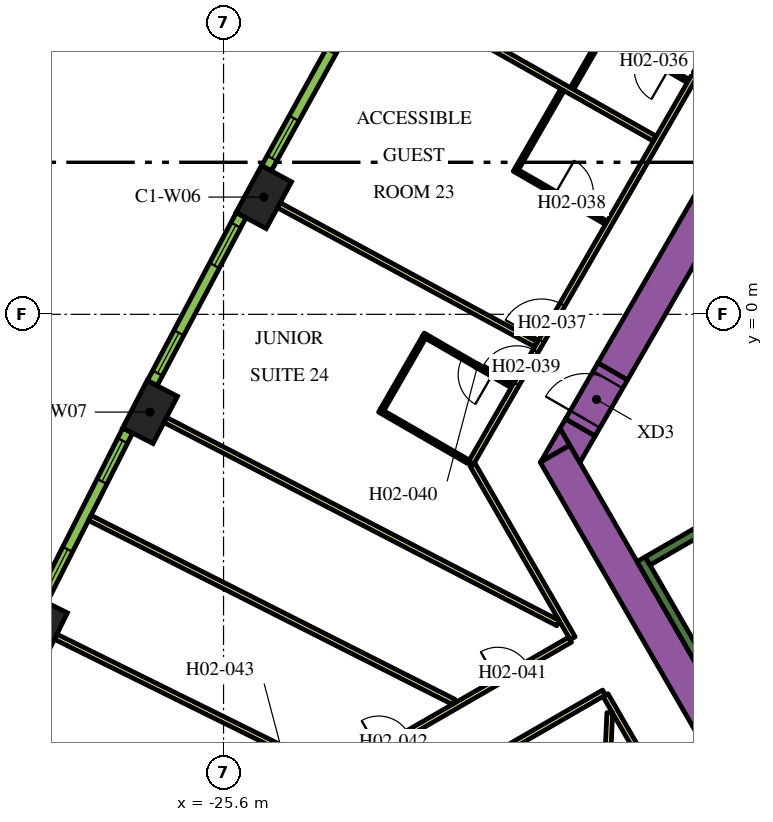
"""IFC4 building model, lengths in metres.
Left out: names, types, materials, properties, quantities, classifications, styles, units other than length and angle.
Written with IfcOpenShell. Run it as: python <this file> out.ifc"""

import sys

from ifc_helpers import new_model, si_unit, direction, frame, frame_2d, origin, origin_2d, place, context, subcontext, project, spatial, polyline, rectangle, outline, extrude, element, fill, save


model = new_model("IFC4")
c1 = context("Model", 3, precision=1e-05, world=origin(), true_north=direction((0.0, 1.0)))
c2 = subcontext(c1, "Body", "Model", "MODEL_VIEW")
j1 = project(units=[si_unit("LENGTHUNIT", "METRE"), si_unit("PLANEANGLEUNIT", "RADIAN")], contexts=[c1])
p1 = place(None, origin())
s1 = spatial("IfcSite", under=j1, at=p1, CompositionType="ELEMENT")
p2 = place(p1, origin())
s2 = spatial("IfcBuilding", under=s1, at=p2, CompositionType="ELEMENT")
p3 = place(p2, frame((0.0, 0.0, 47.1)))
s3 = spatial("IfcBuildingStorey", under=s2, at=p3, CompositionType="ELEMENT", Elevation=47.1)
for number, where, z_axis, x_axis in (
    (1, (-24.54, 3.085, 0.0), (0.0, 0.0, 1.0), (-0.476, -0.88, 0.0)),
    (2, (-27.533, -2.572, 0.0), (0.0, 0.0, 1.0), (-0.459, -0.888, 0.0)),
    (3, (-30.421, -8.284, 0.0), (0.0, 0.0, 1.0), (-0.443, -0.897, 0.0)),
):
    element("IfcColumn", number, at=place(p3, frame(where, z_axis=z_axis, x_axis=x_axis)), inside=s3, PredefinedType="COLUMN", context=c2, shape_type="SweptSolid", body=[
        extrude(rectangle(XDim=1.4, YDim=0.9, at=origin_2d()), origin(), (0.0, 0.0, 1.0), 3.9),
    ])
p4 = place(p3, frame((-15.36, -1.503, 0.0), z_axis=(0.0, 0.0, 1.0), x_axis=(0.50000389221, 0.866023156604, 0.0)))
e4 = element("IfcWall", 4, at=p4, inside=s3, PredefinedType="SOLIDWALL", context=c2, shape_type="SweptSolid", body=[
    extrude(rectangle(XDim=21.0, YDim=0.9, at=frame_2d((10.5, 0.0))), origin(), (0.0, 0.0, 1.0), 3.9),
])
p5 = place(p3, frame((-12.134, -11.883, 0.0), z_axis=(0.0, 0.0, 1.0), x_axis=(-0.500005339912, 0.866022320763, 0.0)))
e5 = element("IfcWall", 5, at=p5, inside=s3, PredefinedType="SOLIDWALL", context=c2, shape_type="SweptSolid", body=[
    extrude(rectangle(XDim=9.488, YDim=0.9, at=frame_2d((4.744, 0.0))), origin(), (0.0, 0.0, 1.0), 3.9),
])
p6 = place(p3, origin())
e6 = element("IfcWall", 6, at=p6, inside=s3, PredefinedType="SOLIDWALL", context=c2, shape_type="SweptSolid", body=[
    extrude(outline(polyline([(-16.489, -3.44), (-17.251, -3.88), (-16.743, -3.0), (-16.489, -3.44)])), origin(), (0.0, 0.0, 1.0), 3.9),
])
e7 = element("IfcWall", 7, at=p6, inside=s3, PredefinedType="SOLIDWALL", context=c2, shape_type="SweptSolid", body=[
    extrude(outline(polyline([(-15.82, -3.201), (-16.223, -3.9), (-16.743, -3.0), (-16.599, -2.751), (-15.82, -3.201)])), origin(), (0.0, 0.0, 1.0), 3.9),
])
p7 = place(p3, frame((-12.885, -9.431, 0.0), z_axis=(0.0, 0.0, 1.0), x_axis=(-0.500020560727, 0.866013532718, 0.0)))
e8 = element("IfcWall", 8, at=p7, inside=s3, PredefinedType="SOLIDWALL", context=c2, shape_type="SweptSolid", body=[
    extrude(rectangle(XDim=3.45, YDim=0.25, at=frame_2d((1.725, 0.0))), origin(), (0.0, 0.0, 1.0), 3.9),
])
p8 = place(p3, frame((-14.44, -6.49, 0.0), z_axis=(0.0, 0.0, 1.0), x_axis=(0.866022966069, 0.500004222222, 0.0)))
e9 = element("IfcWall", 9, at=p8, inside=s3, PredefinedType="SOLIDWALL", context=c2, shape_type="SweptSolid", body=[
    extrude(rectangle(XDim=6.8, YDim=0.25, at=frame_2d((3.4, 0.0))), origin(), (0.0, 0.0, 1.0), 3.9),
])
p9 = place(p3, frame((-16.209, -2.976, 0.0), z_axis=(0.0, 0.0, 1.0), x_axis=(0.499954529098, 0.86605165483, 0.0)))
e10 = element("IfcWall", 10, at=p9, inside=s3, PredefinedType="SOLIDWALL", context=c2, shape_type="SweptSolid", body=[
    extrude(rectangle(XDim=1.7, YDim=0.9, at=frame_2d((0.85, 0.0))), origin(), (0.0, 0.0, 1.0), 3.9),
])
p10 = place(p9, frame((0.25, 0.0, 0.0)))
e11 = element("IfcOpeningElement", 11, at=p10, cuts=e10, PredefinedType="OPENING", context=c2, shape_type="SweptSolid", body=[
    extrude(rectangle(XDim=1.2, YDim=2.1, at=frame_2d((0.6, 1.05))), frame((0.0, 0.46, 0.0), z_axis=(0.0, -1.0, 0.0), x_axis=(1.0, 0.0, 0.0)), (0.0, 0.0, 1.0), 0.92),
])
p11 = place(p3, frame((-19.081, -3.9, 0.0), z_axis=(0.0, 0.0, 1.0), x_axis=(0.499998313975, 0.866026377209, 0.0)))
e12 = element("IfcWall", 12, at=p11, inside=s3, PredefinedType="PARTITIONING", context=c2, shape_type="SweptSolid", body=[
    extrude(rectangle(XDim=25.766, YDim=0.15, at=frame_2d((12.883, 0.0))), origin(), (0.0, 0.0, 1.0), 2.75),
])
p12 = place(p11, frame((16.196, 0.0, 0.0)))
e13 = element("IfcOpeningElement", 13, at=p12, cuts=e12, PredefinedType="OPENING", context=c2, shape_type="SweptSolid", body=[
    extrude(rectangle(XDim=1.0, YDim=2.1, at=frame_2d((0.5, 1.05))), frame((0.0, 0.085, 0.0), z_axis=(0.0, -1.0, 0.0), x_axis=(1.0, 0.0, 0.0)), (0.0, 0.0, 1.0), 0.17),
])
p13 = place(p11, frame((14.889, 0.0, 0.0)))
e14 = element("IfcOpeningElement", 14, at=p13, cuts=e12, PredefinedType="OPENING", context=c2, shape_type="SweptSolid", body=[
    extrude(rectangle(XDim=1.0, YDim=2.1, at=frame_2d((0.5, 1.05))), frame((0.0, 0.085, 0.0), z_axis=(0.0, -1.0, 0.0), x_axis=(1.0, 0.0, 0.0)), (0.0, 0.0, 1.0), 0.17),
])
p14 = place(p11, frame((3.698, 0.0, 0.0)))
e15 = element("IfcOpeningElement", 15, at=p14, cuts=e12, PredefinedType="OPENING", context=c2, shape_type="SweptSolid", body=[
    extrude(rectangle(XDim=1.1, YDim=2.1, at=frame_2d((0.55, 1.05))), frame((0.0, 0.085, 0.0), z_axis=(0.0, -1.0, 0.0), x_axis=(1.0, 0.0, 0.0)), (0.0, 0.0, 1.0), 0.17),
])
p15 = place(p11, frame((2.392, 0.0, 0.0)))
e16 = element("IfcOpeningElement", 16, at=p15, cuts=e12, PredefinedType="OPENING", context=c2, shape_type="SweptSolid", body=[
    extrude(rectangle(XDim=1.0, YDim=2.1, at=frame_2d((0.5, 1.05))), frame((0.0, 0.085, 0.0), z_axis=(0.0, -1.0, 0.0), x_axis=(1.0, 0.0, 0.0)), (0.0, 0.0, 1.0), 0.17),
])
p16 = place(p3, frame((-16.412, -8.523, 0.0), z_axis=(0.0, 0.0, 1.0), x_axis=(-0.500001929737, 0.866024289647, 0.0)))
e17 = element("IfcWall", 17, at=p16, inside=s3, PredefinedType="PARTITIONING", context=c2, shape_type="SweptSolid", body=[
    extrude(rectangle(XDim=5.268, YDim=0.15, at=frame_2d((2.634, 0.0))), origin(), (0.0, 0.0, 1.0), 2.75),
])
p17 = place(p3, frame((-30.463, -16.635, 0.0), z_axis=(0.0, 0.0, 1.0), x_axis=(0.866022394896, 0.500005211512, 0.0)))
e18 = element("IfcWall", 18, at=p17, inside=s3, PredefinedType="PARTITIONING", context=c2, shape_type="SweptSolid", body=[
    extrude(rectangle(XDim=16.144, YDim=0.15, at=frame_2d((8.072, 0.0))), origin(), (0.0, 0.0, 1.0), 2.75),
])
p18 = place(p17, frame((13.948, 0.0, 0.0)))
e19 = element("IfcOpeningElement", 19, at=p18, cuts=e18, PredefinedType="OPENING", context=c2, shape_type="SweptSolid", body=[
    extrude(rectangle(XDim=0.9, YDim=2.1, at=frame_2d((0.45, 1.05))), frame((0.0, 0.085, 0.0), z_axis=(0.0, -1.0, 0.0), x_axis=(1.0, 0.0, 0.0)), (0.0, 0.0, 1.0), 0.17),
])
p19 = place(p17, frame((10.329, 0.0, 0.0)))
e20 = element("IfcOpeningElement", 20, at=p19, cuts=e18, PredefinedType="OPENING", context=c2, shape_type="SweptSolid", body=[
    extrude(rectangle(XDim=0.9, YDim=2.1, at=frame_2d((0.45, 1.05))), frame((0.0, 0.085, 0.0), z_axis=(0.0, -1.0, 0.0), x_axis=(1.0, 0.0, 0.0)), (0.0, 0.0, 1.0), 0.17),
])
p20 = place(p17, frame((7.274, 0.0, 0.0)))
e21 = element("IfcOpeningElement", 21, at=p20, cuts=e18, PredefinedType="OPENING", context=c2, shape_type="SweptSolid", body=[
    extrude(rectangle(XDim=1.0, YDim=2.1, at=frame_2d((0.5, 1.05))), frame((0.0, 0.085, 0.0), z_axis=(0.0, -1.0, 0.0), x_axis=(1.0, 0.0, 0.0)), (0.0, 0.0, 1.0), 0.17),
])
p21 = place(p3, frame((-15.587, -9.952, 0.0), z_axis=(0.0, 0.0, 1.0), x_axis=(-0.866022197818, -0.500005552856, 0.0)))
e22 = element("IfcWall", 22, at=p21, inside=s3, PredefinedType="PARTITIONING", context=c2, shape_type="SweptSolid", body=[
    extrude(rectangle(XDim=16.224, YDim=0.15, at=frame_2d((8.112, 0.0))), origin(), (0.0, 0.0, 1.0), 2.75),
])
p22 = place(p21, frame((7.949, 0.0, 0.0)))
e23 = element("IfcOpeningElement", 23, at=p22, cuts=e22, PredefinedType="OPENING", context=c2, shape_type="SweptSolid", body=[
    extrude(rectangle(XDim=1.0, YDim=2.1, at=frame_2d((0.5, 1.05))), frame((0.0, 0.085, 0.0), z_axis=(0.0, -1.0, 0.0), x_axis=(1.0, 0.0, 0.0)), (0.0, 0.0, 1.0), 0.17),
])
p23 = place(p21, frame((3.172, 0.0, 0.0)))
e24 = element("IfcOpeningElement", 24, at=p23, cuts=e22, PredefinedType="OPENING", context=c2, shape_type="SweptSolid", body=[
    extrude(rectangle(XDim=1.0, YDim=2.1, at=frame_2d((0.5, 1.05))), frame((0.0, 0.085, 0.0), z_axis=(0.0, -1.0, 0.0), x_axis=(1.0, 0.0, 0.0)), (0.0, 0.0, 1.0), 0.17),
])
p24 = place(p3, frame((-12.918, -14.575, 0.0), z_axis=(0.0, 0.0, 1.0), x_axis=(-0.500009150678, 0.866020120573, 0.0)))
e25 = element("IfcWall", 25, at=p24, inside=s3, PredefinedType="PARTITIONING", context=c2, shape_type="SweptSolid", body=[
    extrude(rectangle(XDim=5.258, YDim=0.15, at=frame_2d((2.629, 0.0))), origin(), (0.0, 0.0, 1.0), 2.75),
])
p25 = place(p24, frame((1.888, 0.0, 0.0)))
e26 = element("IfcOpeningElement", 26, at=p25, cuts=e25, PredefinedType="OPENING", context=c2, shape_type="SweptSolid", body=[
    extrude(rectangle(XDim=1.0, YDim=2.1, at=frame_2d((0.5, 1.05))), frame((0.0, 0.085, 0.0), z_axis=(0.0, -1.0, 0.0), x_axis=(1.0, 0.0, 0.0)), (0.0, 0.0, 1.0), 0.17),
])
p26 = place(p3, frame((-30.018, -8.483, 0.0), z_axis=(0.0, 0.0, 1.0), x_axis=(0.896544505264, -0.44295366584, 0.0)))
e27 = element("IfcWall", 27, at=p26, inside=s3, PredefinedType="PARTITIONING", context=c2, shape_type="SweptSolid", body=[
    extrude(rectangle(XDim=8.079, YDim=0.15, at=frame_2d((4.04, 0.0))), origin(), (0.0, 0.0, 1.0), 2.75),
])
p27 = place(p3, frame((-29.12, -5.356, 0.0), z_axis=(0.0, 0.0, 1.0), x_axis=(0.892401965553, -0.451241323327, 0.0)))
e28 = element("IfcWall", 28, at=p27, inside=s3, PredefinedType="PARTITIONING", context=c2, shape_type="SweptSolid", body=[
    extrude(rectangle(XDim=10.729, YDim=0.15, at=frame_2d((5.364, 0.0))), origin(), (0.0, 0.0, 1.0), 2.75),
])
p28 = place(p3, frame((-24.145, 2.871, 0.0), z_axis=(0.0, 0.0, 1.0), x_axis=(0.879551725039, -0.475803281809, 0.0)))
e29 = element("IfcWall", 29, at=p28, inside=s3, PredefinedType="PARTITIONING", context=c2, shape_type="SweptSolid", body=[
    extrude(rectangle(XDim=7.688, YDim=0.15, at=frame_2d((3.844, 0.0))), origin(), (0.0, 0.0, 1.0), 2.75),
])
p29 = place(p3, frame((-27.134, -2.779, 0.0), z_axis=(0.0, 0.0, 1.0), x_axis=(0.8882049501, -0.459447457951, 0.0)))
e30 = element("IfcWall", 30, at=p29, inside=s3, PredefinedType="PARTITIONING", context=c2, shape_type="SweptSolid", body=[
    extrude(rectangle(XDim=11.638, YDim=0.15, at=frame_2d((5.819, 0.0))), origin(), (0.0, 0.0, 1.0), 2.75),
])
p30 = place(p3, frame((-15.973, -22.109, 0.0), z_axis=(0.0, 0.0, 1.0), x_axis=(0.046191717129, 0.998932592955, 0.0)))
e31 = element("IfcWall", 31, at=p30, inside=s3, PredefinedType="PARTITIONING", context=c2, shape_type="SweptSolid", body=[
    extrude(rectangle(XDim=11.638, YDim=0.15, at=frame_2d((5.819, 0.0))), origin(), (0.0, 0.0, 1.0), 2.75),
])
p31 = place(p3, frame((-21.052, 8.464, 0.0), z_axis=(0.0, 0.0, 1.0), x_axis=(0.87059371954, -0.492002617368, 0.0)))
e32 = element("IfcWall", 32, at=p31, inside=s3, PredefinedType="PARTITIONING", context=c2, shape_type="SweptSolid", body=[
    extrude(rectangle(XDim=7.803, YDim=0.15, at=frame_2d((3.902, 0.0))), origin(), (0.0, 0.0, 1.0), 2.75),
])
p32 = place(p3, frame((-13.373, 6.138, 0.0), z_axis=(0.0, 0.0, 1.0), x_axis=(-0.866062058628, 0.499936506574, 0.0)))
e33 = element("IfcWall", 33, at=p32, inside=s3, PredefinedType="PARTITIONING", context=c2, shape_type="SweptSolid", body=[
    extrude(rectangle(XDim=2.6, YDim=0.1, at=frame_2d((1.3, 0.0))), origin(), (0.0, 0.0, 1.0), 2.75),
])
p33 = place(p32, frame((0.6, 0.0, 0.0)))
e34 = element("IfcOpeningElement", 34, at=p33, cuts=e33, PredefinedType="OPENING", context=c2, shape_type="SweptSolid", body=[
    extrude(rectangle(XDim=0.9, YDim=2.1, at=frame_2d((0.45, 1.05))), frame((0.0, 0.06, 0.0), z_axis=(0.0, -1.0, 0.0), x_axis=(1.0, 0.0, 0.0)), (0.0, 0.0, 1.0), 0.12),
])
p34 = place(p3, frame((-15.606, 7.37, 0.0), z_axis=(0.0, 0.0, 1.0), x_axis=(-0.499974350878, -0.866040211805, 0.0)))
e35 = element("IfcWall", 35, at=p34, inside=s3, PredefinedType="PARTITIONING", context=c2, shape_type="SweptSolid", body=[
    extrude(rectangle(XDim=1.65, YDim=0.1, at=frame_2d((0.825, 0.0))), origin(), (0.0, 0.0, 1.0), 2.75),
])
p35 = place(p3, frame((-17.951, 3.808, 0.0), z_axis=(0.0, 0.0, 1.0), x_axis=(0.866034573852, -0.49998411664, 0.0)))
e36 = element("IfcWall", 36, at=p35, inside=s3, PredefinedType="PARTITIONING", context=c2, shape_type="SweptSolid", body=[
    extrude(rectangle(XDim=2.8, YDim=0.1, at=frame_2d((1.4, 0.0))), origin(), (0.0, 0.0, 1.0), 2.75),
])
p36 = place(p35, frame((1.25, 0.0, 0.0)))
e37 = element("IfcOpeningElement", 37, at=p36, cuts=e36, PredefinedType="OPENING", context=c2, shape_type="SweptSolid", body=[
    extrude(rectangle(XDim=1.0, YDim=2.1, at=frame_2d((0.5, 1.05))), frame((0.0, 0.06, 0.0), z_axis=(0.0, -1.0, 0.0), x_axis=(1.0, 0.0, 0.0)), (0.0, 0.0, 1.0), 0.12),
])
p37 = place(p3, frame((-17.878, 3.835, 0.0), z_axis=(0.0, 0.0, 1.0), x_axis=(0.500061428766, 0.865989934965, 0.0)))
e38 = element("IfcWall", 38, at=p37, inside=s3, PredefinedType="PARTITIONING", context=c2, shape_type="SweptSolid", body=[
    extrude(rectangle(XDim=2.39, YDim=0.1, at=frame_2d((1.195, 0.0))), origin(), (0.0, 0.0, 1.0), 2.75),
])
p38 = place(p3, frame((-18.006, -1.888, 0.0), z_axis=(0.0, 0.0, 1.0), x_axis=(-0.866036505625, 0.499980770555, 0.0)))
e39 = element("IfcWall", 39, at=p38, inside=s3, PredefinedType="PARTITIONING", context=c2, shape_type="SweptSolid", body=[
    extrude(rectangle(XDim=2.7, YDim=0.1, at=frame_2d((1.35, 0.0))), origin(), (0.0, 0.0, 1.0), 2.75),
])
p39 = place(p38, frame((0.6, 0.0, 0.0)))
e40 = element("IfcOpeningElement", 40, at=p39, cuts=e39, PredefinedType="OPENING", context=c2, shape_type="SweptSolid", body=[
    extrude(rectangle(XDim=0.9, YDim=2.1, at=frame_2d((0.45, 1.05))), frame((0.0, 0.06, 0.0), z_axis=(0.0, -1.0, 0.0), x_axis=(1.0, 0.0, 0.0)), (0.0, 0.0, 1.0), 0.12),
])
p40 = place(p3, frame((-20.326, -0.606, 0.0), z_axis=(0.0, 0.0, 1.0), x_axis=(-0.499946605688, -0.86605622881, 0.0)))
e41 = element("IfcWall", 41, at=p40, inside=s3, PredefinedType="PARTITIONING", context=c2, shape_type="SweptSolid", body=[
    extrude(rectangle(XDim=2.2, YDim=0.1, at=frame_2d((1.1, 0.0))), origin(), (0.0, 0.0, 1.0), 2.75),
])
p41 = place(p3, frame((-19.156, -3.88, 0.0), z_axis=(0.0, 0.0, 1.0), x_axis=(-0.86599734893, 0.500048589285, 0.0)))
e42 = element("IfcWall", 42, at=p41, inside=s3, PredefinedType="PARTITIONING", context=c2, shape_type="SweptSolid", body=[
    extrude(rectangle(XDim=2.7, YDim=0.1, at=frame_2d((1.35, 0.0))), origin(), (0.0, 0.0, 1.0), 2.75),
])
p42 = place(p3, frame((-22.05, 8.22, 0.0), z_axis=(0.0, 0.0, 1.0), x_axis=(-0.483912572871, -0.875116347589, 0.0)))
e43 = element("IfcWall", 43, at=p42, inside=s3, PredefinedType="SOLIDWALL", context=c2, shape_type="SweptSolid", body=[
    extrude(rectangle(XDim=4.998, YDim=0.29, at=frame_2d((2.499, 0.0))), origin(), (0.0, 0.0, 1.0), 3.65),
])
p43 = place(p42, frame((0.297, 0.0, 0.9)))
e44 = element("IfcOpeningElement", 44, at=p43, cuts=e43, PredefinedType="OPENING", context=c2, shape_type="SweptSolid", body=[
    extrude(rectangle(XDim=1.2, YDim=2.15, at=frame_2d((0.6, 1.075))), frame((0.0, 0.155, 0.0), z_axis=(0.0, -1.0, 0.0), x_axis=(1.0, 0.0, 0.0)), (0.0, 0.0, 1.0), 0.31),
])
p44 = place(p42, frame((3.501, 0.0, 0.9)))
e45 = element("IfcOpeningElement", 45, at=p44, cuts=e43, PredefinedType="OPENING", context=c2, shape_type="SweptSolid", body=[
    extrude(rectangle(XDim=1.2, YDim=2.15, at=frame_2d((0.6, 1.075))), frame((0.0, 0.155, 0.0), z_axis=(0.0, -1.0, 0.0), x_axis=(1.0, 0.0, 0.0)), (0.0, 0.0, 1.0), 0.31),
])
p45 = place(p3, frame((-25.138, 2.608, 0.0), z_axis=(0.0, 0.0, 1.0), x_axis=(-0.467629620899, -0.883924509026, 0.0)))
e46 = element("IfcWall", 46, at=p45, inside=s3, PredefinedType="SOLIDWALL", context=c2, shape_type="SweptSolid", body=[
    extrude(rectangle(XDim=4.998, YDim=0.29, at=frame_2d((2.499, 0.0))), origin(), (0.0, 0.0, 1.0), 3.65),
])
p46 = place(p45, frame((0.297, 0.0, 0.9)))
e47 = element("IfcOpeningElement", 47, at=p46, cuts=e46, PredefinedType="OPENING", context=c2, shape_type="SweptSolid", body=[
    extrude(rectangle(XDim=1.2, YDim=2.15, at=frame_2d((0.6, 1.075))), frame((0.0, 0.155, 0.0), z_axis=(0.0, -1.0, 0.0), x_axis=(1.0, 0.0, 0.0)), (0.0, 0.0, 1.0), 0.31),
])
p47 = place(p45, frame((3.501, 0.0, 0.9)))
e48 = element("IfcOpeningElement", 48, at=p47, cuts=e46, PredefinedType="OPENING", context=c2, shape_type="SweptSolid", body=[
    extrude(rectangle(XDim=1.2, YDim=2.15, at=frame_2d((0.6, 1.075))), frame((0.0, 0.155, 0.0), z_axis=(0.0, -1.0, 0.0), x_axis=(1.0, 0.0, 0.0)), (0.0, 0.0, 1.0), 0.31),
])
p48 = place(p3, frame((-28.122, -3.06, 0.0), z_axis=(0.0, 0.0, 1.0), x_axis=(-0.451233929645, -0.892405704115, 0.0)))
e49 = element("IfcWall", 49, at=p48, inside=s3, PredefinedType="SOLIDWALL", context=c2, shape_type="SweptSolid", body=[
    extrude(rectangle(XDim=4.998, YDim=0.29, at=frame_2d((2.499, 0.0))), origin(), (0.0, 0.0, 1.0), 3.65),
])
p49 = place(p48, frame((0.297, 0.0, 0.9)))
e50 = element("IfcOpeningElement", 50, at=p49, cuts=e49, PredefinedType="OPENING", context=c2, shape_type="SweptSolid", body=[
    extrude(rectangle(XDim=1.2, YDim=2.15, at=frame_2d((0.6, 1.075))), frame((0.0, 0.155, 0.0), z_axis=(0.0, -1.0, 0.0), x_axis=(1.0, 0.0, 0.0)), (0.0, 0.0, 1.0), 0.31),
])
p50 = place(p48, frame((3.501, 0.0, 0.9)))
e51 = element("IfcOpeningElement", 51, at=p50, cuts=e49, PredefinedType="OPENING", context=c2, shape_type="SweptSolid", body=[
    extrude(rectangle(XDim=1.2, YDim=2.15, at=frame_2d((0.6, 1.075))), frame((0.0, 0.155, 0.0), z_axis=(0.0, -1.0, 0.0), x_axis=(1.0, 0.0, 0.0)), (0.0, 0.0, 1.0), 0.31),
])
p51 = place(p10, origin())
e52 = element("IfcDoor", 52, at=p51, inside=s3, OperationType="SINGLE_SWING_LEFT", PredefinedType="DOOR", context=c2, shape_type="SweptSolid", body=[
    extrude(rectangle(XDim=1.2, YDim=2.1, at=frame_2d((0.6, 1.05))), frame((0.0, 0.025, 0.0), z_axis=(0.0, -1.0, 0.0), x_axis=(1.0, 0.0, 0.0)), (0.0, 0.0, 1.0), 0.05),
])
fill(e11, e52)
p52 = place(p33, origin())
e53 = element("IfcDoor", 53, at=p52, inside=s3, OperationType="SINGLE_SWING_LEFT", PredefinedType="DOOR", context=c2, shape_type="SweptSolid", body=[
    extrude(rectangle(XDim=0.9, YDim=2.1, at=frame_2d((0.45, 1.05))), frame((0.0, 0.025, 0.0), z_axis=(0.0, -1.0, 0.0), x_axis=(1.0, 0.0, 0.0)), (0.0, 0.0, 1.0), 0.05),
])
fill(e34, e53)
p53 = place(p14, origin())
e54 = element("IfcDoor", 54, at=p53, inside=s3, OperationType="SINGLE_SWING_LEFT", PredefinedType="DOOR", context=c2, shape_type="SweptSolid", body=[
    extrude(rectangle(XDim=1.1, YDim=2.1, at=frame_2d((0.55, 1.05))), frame((0.0, 0.025, 0.0), z_axis=(0.0, -1.0, 0.0), x_axis=(1.0, 0.0, 0.0)), (0.0, 0.0, 1.0), 0.05),
])
fill(e15, e54)
p54 = place(p36, origin())
e55 = element("IfcDoor", 55, at=p54, inside=s3, OperationType="SINGLE_SWING_LEFT", PredefinedType="DOOR", context=c2, shape_type="SweptSolid", body=[
    extrude(rectangle(XDim=1.0, YDim=2.1, at=frame_2d((0.5, 1.05))), frame((0.0, 0.025, 0.0), z_axis=(0.0, -1.0, 0.0), x_axis=(1.0, 0.0, 0.0)), (0.0, 0.0, 1.0), 0.05),
])
fill(e37, e55)
p55 = place(p15, origin())
e56 = element("IfcDoor", 56, at=p55, inside=s3, OperationType="SINGLE_SWING_RIGHT", PredefinedType="DOOR", context=c2, shape_type="SweptSolid", body=[
    extrude(rectangle(XDim=1.0, YDim=2.1, at=frame_2d((0.5, 1.05))), frame((0.0, 0.025, 0.0), z_axis=(0.0, -1.0, 0.0), x_axis=(1.0, 0.0, 0.0)), (0.0, 0.0, 1.0), 0.05),
])
fill(e16, e56)
p56 = place(p39, origin())
e57 = element("IfcDoor", 57, at=p56, inside=s3, OperationType="SINGLE_SWING_RIGHT", PredefinedType="DOOR", context=c2, shape_type="SweptSolid", body=[
    extrude(rectangle(XDim=0.9, YDim=2.1, at=frame_2d((0.45, 1.05))), frame((0.0, 0.025, 0.0), z_axis=(0.0, -1.0, 0.0), x_axis=(1.0, 0.0, 0.0)), (0.0, 0.0, 1.0), 0.05),
])
fill(e40, e57)
p57 = place(p18, origin())
e58 = element("IfcDoor", 58, at=p57, inside=s3, OperationType="SINGLE_SWING_LEFT", PredefinedType="DOOR", context=c2, shape_type="SweptSolid", body=[
    extrude(rectangle(XDim=0.9, YDim=2.1, at=frame_2d((0.45, 1.05))), frame((0.0, 0.025, 0.0), z_axis=(0.0, -1.0, 0.0), x_axis=(1.0, 0.0, 0.0)), (0.0, 0.0, 1.0), 0.05),
])
fill(e19, e58)
p58 = place(p19, origin())
e59 = element("IfcDoor", 59, at=p58, inside=s3, OperationType="SINGLE_SWING_RIGHT", PredefinedType="DOOR", context=c2, shape_type="SweptSolid", body=[
    extrude(rectangle(XDim=0.9, YDim=2.1, at=frame_2d((0.45, 1.05))), frame((0.0, 0.025, 0.0), z_axis=(0.0, -1.0, 0.0), x_axis=(1.0, 0.0, 0.0)), (0.0, 0.0, 1.0), 0.05),
])
fill(e20, e59)
p59 = place(p44, origin())
e60 = element("IfcWindow", 60, at=p59, inside=s3, PartitioningType="DOUBLE_PANEL_VERTICAL", PredefinedType="WINDOW", context=c2, shape_type="SweptSolid", body=[
    extrude(rectangle(XDim=1.2, YDim=2.15, at=frame_2d((0.6, 1.075))), frame((0.0, 0.015, 0.0), z_axis=(0.0, -1.0, 0.0), x_axis=(1.0, 0.0, 0.0)), (0.0, 0.0, 1.0), 0.06),
])
fill(e45, e60)
p60 = place(p46, origin())
e61 = element("IfcWindow", 61, at=p60, inside=s3, PartitioningType="DOUBLE_PANEL_VERTICAL", PredefinedType="WINDOW", context=c2, shape_type="SweptSolid", body=[
    extrude(rectangle(XDim=1.2, YDim=2.15, at=frame_2d((0.6, 1.075))), frame((0.0, 0.015, 0.0), z_axis=(0.0, -1.0, 0.0), x_axis=(1.0, 0.0, 0.0)), (0.0, 0.0, 1.0), 0.06),
])
fill(e47, e61)
p61 = place(p47, origin())
e62 = element("IfcWindow", 62, at=p61, inside=s3, PartitioningType="DOUBLE_PANEL_VERTICAL", PredefinedType="WINDOW", context=c2, shape_type="SweptSolid", body=[
    extrude(rectangle(XDim=1.2, YDim=2.15, at=frame_2d((0.6, 1.075))), frame((0.0, 0.015, 0.0), z_axis=(0.0, -1.0, 0.0), x_axis=(1.0, 0.0, 0.0)), (0.0, 0.0, 1.0), 0.06),
])
fill(e48, e62)
p62 = place(p49, origin())
e63 = element("IfcWindow", 63, at=p62, inside=s3, PartitioningType="DOUBLE_PANEL_VERTICAL", PredefinedType="WINDOW", context=c2, shape_type="SweptSolid", body=[
    extrude(rectangle(XDim=1.2, YDim=2.15, at=frame_2d((0.6, 1.075))), frame((0.0, 0.015, 0.0), z_axis=(0.0, -1.0, 0.0), x_axis=(1.0, 0.0, 0.0)), (0.0, 0.0, 1.0), 0.06),
])
fill(e50, e63)
p63 = place(p50, origin())
e64 = element("IfcWindow", 64, at=p63, inside=s3, PartitioningType="DOUBLE_PANEL_VERTICAL", PredefinedType="WINDOW", context=c2, shape_type="SweptSolid", body=[
    extrude(rectangle(XDim=1.2, YDim=2.15, at=frame_2d((0.6, 1.075))), frame((0.0, 0.015, 0.0), z_axis=(0.0, -1.0, 0.0), x_axis=(1.0, 0.0, 0.0)), (0.0, 0.0, 1.0), 0.06),
])
fill(e51, e64)
save(model, sys.argv[1])
